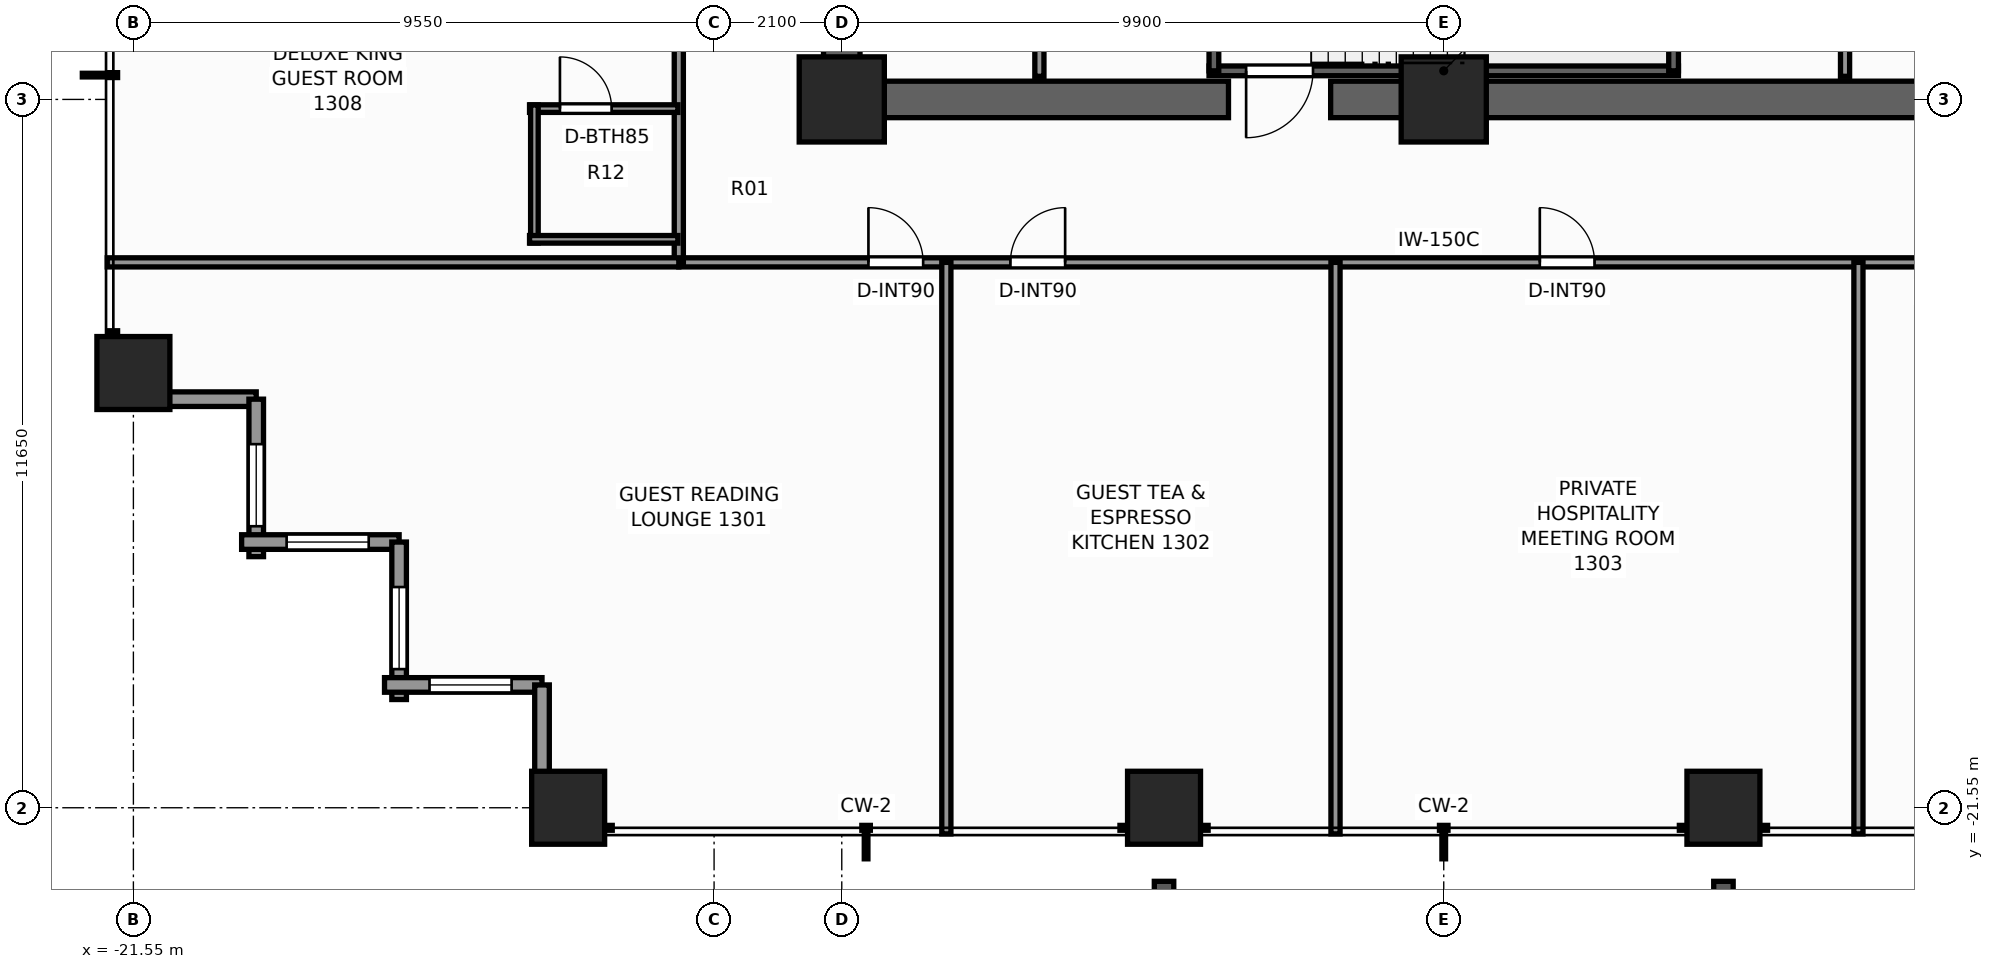
"""IFC4 building model, lengths in metres.
Left out: names, types, materials, properties, quantities, classifications, styles, units other than length and angle.
Written with IfcOpenShell. Run it as: python <this file> out.ifc"""

import sys

from ifc_helpers import new_model, si_unit, direction, frame, frame_2d, origin, origin_2d, place, context, subcontext, project, spatial, rectangle, extrude, element, fill, save


model = new_model("IFC4")
c1 = context("Model", 3, precision=1e-05, world=origin(), true_north=direction((0.0, 1.0)))
c2 = subcontext(c1, "Body", "Model", "MODEL_VIEW")
j1 = project(units=[si_unit("LENGTHUNIT", "METRE"), si_unit("PLANEANGLEUNIT", "RADIAN")], contexts=[c1])
p1 = place(None, origin())
s1 = spatial("IfcSite", under=j1, at=p1, CompositionType="ELEMENT")
p2 = place(p1, origin())
s2 = spatial("IfcBuilding", under=s1, at=p2, CompositionType="ELEMENT")
p3 = place(p2, frame((0.0, 0.0, 46.9)))
s3 = spatial("IfcBuildingStorey", under=s2, at=p3, CompositionType="ELEMENT", Elevation=46.9)
p4 = place(p3, frame((10.2, -9.9, 0.0), z_axis=(0.0, 0.0, 1.0), x_axis=(-1.0, 0.0, 0.0)))
e1 = element("IfcWall", 1, at=p4, inside=s3, PredefinedType="SHEAR", context=c2, shape_type="SweptSolid", body=[
    extrude(rectangle(XDim=12.06, YDim=0.6, at=frame_2d((6.03, 0.0))), origin(), (0.0, 0.0, 1.0), 3.3),
])
p5 = place(p3, frame((-3.54, -9.9, 0.0), z_axis=(0.0, 0.0, 1.0), x_axis=(-1.0, 0.0, 0.0)))
e2 = element("IfcWall", 2, at=p5, inside=s3, PredefinedType="SHEAR", context=c2, shape_type="SweptSolid", body=[
    extrude(rectangle(XDim=6.66, YDim=0.6, at=frame_2d((3.33, 0.0))), origin(), (0.0, 0.0, 1.0), 3.3),
])
p6 = place(p3, frame((-9.9, -9.6, 0.0), z_axis=(0.0, 0.0, 1.0), x_axis=(0.0, 1.0, 0.0)))
e3 = element("IfcWall", 3, at=p6, inside=s3, PredefinedType="SHEAR", context=c2, shape_type="SweptSolid", body=[
    extrude(rectangle(XDim=4.05, YDim=0.6, at=frame_2d((2.025, 0.0))), origin(), (0.0, 0.0, 1.0), 3.3),
])
for number, where, z_axis, x_axis in (
    (4, (-9.9, -9.9, 0.0), (0.0, 0.0, 1.0), (1.0, 0.0, 0.0)),
    (5, (0.0, -9.9, 0.0), (0.0, 0.0, 1.0), (1.0, 0.0, 0.0)),
):
    element("IfcColumn", number, at=place(p3, frame(where, z_axis=z_axis, x_axis=x_axis)), inside=s3, PredefinedType="COLUMN", context=c2, shape_type="SweptSolid", body=[
        extrude(rectangle(XDim=1.4, YDim=1.4, at=origin_2d()), origin(), (0.0, 0.0, 1.0), 3.3),
    ])
for number, where, z_axis, x_axis in (
    (6, (-14.4, -21.55, 0.0), (0.0, 0.0, 1.0), (1.0, 0.0, 0.0)),
    (7, (-4.6, -21.55, 0.0), (0.0, 0.0, 1.0), (1.0, 0.0, 0.0)),
    (8, (4.6, -21.55, 0.0), (0.0, 0.0, 1.0), (1.0, 0.0, 0.0)),
    (9, (-21.55, -14.4, 0.0), (0.0, 0.0, 1.0), (1.0, 0.0, 0.0)),
):
    element("IfcColumn", number, at=place(p3, frame(where, z_axis=z_axis, x_axis=x_axis)), inside=s3, PredefinedType="COLUMN", context=c2, shape_type="SweptSolid", body=[
        extrude(rectangle(XDim=1.2, YDim=1.2, at=origin_2d()), origin(), (0.0, 0.0, 1.0), 3.3),
    ])
p7 = place(p3, frame((-19.53, -14.83, 0.0), z_axis=(0.0, 0.0, 1.0), x_axis=(-1.0, 0.0, 0.0)))
e10 = element("IfcWall", 10, at=p7, inside=s3, PredefinedType="STANDARD", context=c2, shape_type="SweptSolid", body=[
    extrude(rectangle(XDim=2.59, YDim=0.24, at=frame_2d((1.295, 0.0))), origin(), (0.0, 0.0, 1.0), 2.439),
])
p8 = place(p3, frame((-19.53, -17.42, 0.0), z_axis=(0.0, 0.0, 1.0), x_axis=(0.0, 1.0, 0.0)))
e11 = element("IfcWall", 11, at=p8, inside=s3, PredefinedType="STANDARD", context=c2, shape_type="SweptSolid", body=[
    extrude(rectangle(XDim=2.59, YDim=0.24, at=frame_2d((1.295, 0.0))), origin(), (0.0, 0.0, 1.0), 2.439),
])
p9 = place(p8, frame((0.5, 0.0, 0.65)))
e12 = element("IfcOpeningElement", 12, at=p9, cuts=e11, PredefinedType="OPENING", context=c2, shape_type="SweptSolid", body=[
    extrude(rectangle(XDim=1.35, YDim=1.55, at=frame_2d((0.675, 0.775))), frame((0.0, 0.13, 0.0), z_axis=(0.0, -1.0, 0.0), x_axis=(1.0, 0.0, 0.0)), (0.0, 0.0, 1.0), 0.26),
])
p10 = place(p3, frame((-17.18, -17.18, 0.0), z_axis=(0.0, 0.0, 1.0), x_axis=(-1.0, 0.0, 0.0)))
e13 = element("IfcWall", 13, at=p10, inside=s3, PredefinedType="STANDARD", context=c2, shape_type="SweptSolid", body=[
    extrude(rectangle(XDim=2.59, YDim=0.24, at=frame_2d((1.295, 0.0))), origin(), (0.0, 0.0, 1.0), 2.439),
])
p11 = place(p10, frame((0.5, 0.0, 0.65)))
e14 = element("IfcOpeningElement", 14, at=p11, cuts=e13, PredefinedType="OPENING", context=c2, shape_type="SweptSolid", body=[
    extrude(rectangle(XDim=1.35, YDim=1.55, at=frame_2d((0.675, 0.775))), frame((0.0, 0.13, 0.0), z_axis=(0.0, -1.0, 0.0), x_axis=(1.0, 0.0, 0.0)), (0.0, 0.0, 1.0), 0.26),
])
p12 = place(p3, frame((-17.18, -19.77, 0.0), z_axis=(0.0, 0.0, 1.0), x_axis=(0.0, 1.0, 0.0)))
e15 = element("IfcWall", 15, at=p12, inside=s3, PredefinedType="STANDARD", context=c2, shape_type="SweptSolid", body=[
    extrude(rectangle(XDim=2.59, YDim=0.24, at=frame_2d((1.295, 0.0))), origin(), (0.0, 0.0, 1.0), 2.439),
])
p13 = place(p12, frame((0.5, 0.0, 0.65)))
e16 = element("IfcOpeningElement", 16, at=p13, cuts=e15, PredefinedType="OPENING", context=c2, shape_type="SweptSolid", body=[
    extrude(rectangle(XDim=1.35, YDim=1.55, at=frame_2d((0.675, 0.775))), frame((0.0, 0.13, 0.0), z_axis=(0.0, -1.0, 0.0), x_axis=(1.0, 0.0, 0.0)), (0.0, 0.0, 1.0), 0.26),
])
p14 = place(p3, frame((-14.83, -19.53, 0.0), z_axis=(0.0, 0.0, 1.0), x_axis=(-1.0, 0.0, 0.0)))
e17 = element("IfcWall", 17, at=p14, inside=s3, PredefinedType="STANDARD", context=c2, shape_type="SweptSolid", body=[
    extrude(rectangle(XDim=2.59, YDim=0.24, at=frame_2d((1.295, 0.0))), origin(), (0.0, 0.0, 1.0), 2.439),
])
p15 = place(p14, frame((0.5, 0.0, 0.65)))
e18 = element("IfcOpeningElement", 18, at=p15, cuts=e17, PredefinedType="OPENING", context=c2, shape_type="SweptSolid", body=[
    extrude(rectangle(XDim=1.35, YDim=1.55, at=frame_2d((0.675, 0.775))), frame((0.0, 0.13, 0.0), z_axis=(0.0, -1.0, 0.0), x_axis=(1.0, 0.0, 0.0)), (0.0, 0.0, 1.0), 0.26),
])
p16 = place(p3, frame((-14.83, -22.12, 0.0), z_axis=(0.0, 0.0, 1.0), x_axis=(0.0, 1.0, 0.0)))
e19 = element("IfcWall", 19, at=p16, inside=s3, PredefinedType="STANDARD", context=c2, shape_type="SweptSolid", body=[
    extrude(rectangle(XDim=2.59, YDim=0.24, at=frame_2d((1.295, 0.0))), origin(), (0.0, 0.0, 1.0), 2.439),
])
p17 = place(p3, frame((3.86, -9.43, 0.0), z_axis=(0.0, 0.0, 1.0), x_axis=(-1.0, 0.0, 0.0)))
e20 = element("IfcWall", 20, at=p17, inside=s3, PredefinedType="SHEAR", context=c2, shape_type="SweptSolid", body=[
    extrude(rectangle(XDim=7.72, YDim=0.16, at=frame_2d((3.86, 0.0))), origin(), (0.0, 0.0, 1.0), 3.3),
])
p18 = place(p17, frame((6.01, 0.0, 0.0)))
e21 = element("IfcOpeningElement", 21, at=p18, cuts=e20, PredefinedType="OPENING", context=c2, shape_type="SweptSolid", body=[
    extrude(rectangle(XDim=1.1, YDim=2.2, at=frame_2d((0.55, 1.1))), frame((0.0, 0.09, 0.0), z_axis=(0.0, -1.0, 0.0), x_axis=(1.0, 0.0, 0.0)), (0.0, 0.0, 1.0), 0.18),
])
for number, where, z_axis, x_axis in (
    (22, (-3.78, -9.43, 0.0), (0.0, 0.0, 1.0), (0.0, 1.0, 0.0)),
    (23, (3.78, -9.43, 0.0), (0.0, 0.0, 1.0), (0.0, 1.0, 0.0)),
):
    element("IfcWall", number, at=place(p3, frame(where, z_axis=z_axis, x_axis=x_axis)), inside=s3, PredefinedType="SHEAR", context=c2, shape_type="SweptSolid", body=[
        extrude(rectangle(XDim=3.35, YDim=0.16, at=frame_2d((1.675, 0.0))), origin(), (0.0, 0.0, 1.0), 3.3),
    ])
p19 = place(p3, frame((-6.65, -9.52, 0.0), z_axis=(0.0, 0.0, 1.0), x_axis=(0.0, 1.0, 0.0)))
e24 = element("IfcWall", 24, at=p19, inside=s3, PredefinedType="PARTITIONING", context=c2, shape_type="SweptSolid", body=[
    extrude(rectangle(XDim=3.8, YDim=0.15, at=frame_2d((1.9, 0.0))), origin(), (0.0, 0.0, 1.0), 3.06),
])
p20 = place(p19, frame((0.9, 0.0, 0.0)))
e25 = element("IfcOpeningElement", 25, at=p20, cuts=e24, PredefinedType="OPENING", context=c2, shape_type="SweptSolid", body=[
    extrude(rectangle(XDim=0.85, YDim=2.03, at=frame_2d((0.425, 1.015))), frame((0.0, 0.085, 0.0), z_axis=(0.0, -1.0, 0.0), x_axis=(1.0, 0.0, 0.0)), (0.0, 0.0, 1.0), 0.17),
])
p21 = place(p3, frame((6.6, -9.52, 0.0), z_axis=(0.0, 0.0, 1.0), x_axis=(0.0, 1.0, 0.0)))
e26 = element("IfcWall", 26, at=p21, inside=s3, PredefinedType="PARTITIONING", context=c2, shape_type="SweptSolid", body=[
    extrude(rectangle(XDim=3.8, YDim=0.15, at=frame_2d((1.9, 0.0))), origin(), (0.0, 0.0, 1.0), 3.06),
])
p22 = place(p21, frame((0.9, 0.0, 0.0)))
e27 = element("IfcOpeningElement", 27, at=p22, cuts=e26, PredefinedType="OPENING", context=c2, shape_type="SweptSolid", body=[
    extrude(rectangle(XDim=0.85, YDim=2.03, at=frame_2d((0.425, 1.015))), frame((0.0, 0.085, 0.0), z_axis=(0.0, -1.0, 0.0), x_axis=(1.0, 0.0, 0.0)), (0.0, 0.0, 1.0), 0.17),
])
p23 = place(p3, frame((-12.58, -12.58, 0.0), z_axis=(0.0, 0.0, 1.0), x_axis=(1.0, 0.0, 0.0)))
e28 = element("IfcWall", 28, at=p23, inside=s3, PredefinedType="PARTITIONING", context=c2, shape_type="SweptSolid", body=[
    extrude(rectangle(XDim=25.0, YDim=0.15, at=frame_2d((12.5, 0.0))), origin(), (0.0, 0.0, 1.0), 2.272),
])
p24 = place(p23, frame((3.118, 0.0, 0.0)))
e29 = element("IfcOpeningElement", 29, at=p24, cuts=e28, PredefinedType="OPENING", context=c2, shape_type="SweptSolid", body=[
    extrude(rectangle(XDim=0.9, YDim=2.06, at=frame_2d((0.45, 1.03))), frame((0.0, 0.085, 0.0), z_axis=(0.0, -1.0, 0.0), x_axis=(1.0, 0.0, 0.0)), (0.0, 0.0, 1.0), 0.17),
])
p25 = place(p23, frame((5.454, 0.0, 0.0)))
e30 = element("IfcOpeningElement", 30, at=p25, cuts=e28, PredefinedType="OPENING", context=c2, shape_type="SweptSolid", body=[
    extrude(rectangle(XDim=0.9, YDim=2.06, at=frame_2d((0.45, 1.03))), frame((0.0, 0.085, 0.0), z_axis=(0.0, -1.0, 0.0), x_axis=(1.0, 0.0, 0.0)), (0.0, 0.0, 1.0), 0.17),
])
p26 = place(p23, frame((14.16, 0.0, 0.0)))
e31 = element("IfcOpeningElement", 31, at=p26, cuts=e28, PredefinedType="OPENING", context=c2, shape_type="SweptSolid", body=[
    extrude(rectangle(XDim=0.9, YDim=2.06, at=frame_2d((0.45, 1.03))), frame((0.0, 0.085, 0.0), z_axis=(0.0, -1.0, 0.0), x_axis=(1.0, 0.0, 0.0)), (0.0, 0.0, 1.0), 0.17),
])
p27 = place(p23, frame((20.541, 0.0, 0.0)))
e32 = element("IfcOpeningElement", 32, at=p27, cuts=e28, PredefinedType="OPENING", context=c2, shape_type="SweptSolid", body=[
    extrude(rectangle(XDim=0.9, YDim=2.06, at=frame_2d((0.45, 1.03))), frame((0.0, 0.085, 0.0), z_axis=(0.0, -1.0, 0.0), x_axis=(1.0, 0.0, 0.0)), (0.0, 0.0, 1.0), 0.17),
])
p28 = place(p3, frame((-12.58, -12.58, 0.0), z_axis=(0.0, 0.0, 1.0), x_axis=(0.0, 1.0, 0.0)))
e33 = element("IfcWall", 33, at=p28, inside=s3, PredefinedType="PARTITIONING", context=c2, shape_type="SweptSolid", body=[
    extrude(rectangle(XDim=24.84, YDim=0.15, at=frame_2d((12.42, 0.0))), origin(), (0.0, 0.0, 1.0), 2.272),
])
p29 = place(p28, frame((3.856, 0.0, 0.0)))
e34 = element("IfcOpeningElement", 34, at=p29, cuts=e33, PredefinedType="OPENING", context=c2, shape_type="SweptSolid", body=[
    extrude(rectangle(XDim=0.95, YDim=2.06, at=frame_2d((0.475, 1.03))), frame((0.0, 0.085, 0.0), z_axis=(0.0, -1.0, 0.0), x_axis=(1.0, 0.0, 0.0)), (0.0, 0.0, 1.0), 0.17),
])
p30 = place(p28, frame((9.119, 0.0, 0.0)))
e35 = element("IfcOpeningElement", 35, at=p30, cuts=e33, PredefinedType="OPENING", context=c2, shape_type="SweptSolid", body=[
    extrude(rectangle(XDim=0.95, YDim=2.06, at=frame_2d((0.475, 1.03))), frame((0.0, 0.085, 0.0), z_axis=(0.0, -1.0, 0.0), x_axis=(1.0, 0.0, 0.0)), (0.0, 0.0, 1.0), 0.17),
])
p31 = place(p28, frame((14.428, 0.0, 0.0)))
e36 = element("IfcOpeningElement", 36, at=p31, cuts=e33, PredefinedType="OPENING", context=c2, shape_type="SweptSolid", body=[
    extrude(rectangle(XDim=0.95, YDim=2.06, at=frame_2d((0.475, 1.03))), frame((0.0, 0.085, 0.0), z_axis=(0.0, -1.0, 0.0), x_axis=(1.0, 0.0, 0.0)), (0.0, 0.0, 1.0), 0.17),
])
p32 = place(p28, frame((20.309, 0.0, 0.0)))
e37 = element("IfcOpeningElement", 37, at=p32, cuts=e33, PredefinedType="OPENING", context=c2, shape_type="SweptSolid", body=[
    extrude(rectangle(XDim=0.95, YDim=2.06, at=frame_2d((0.475, 1.03))), frame((0.0, 0.085, 0.0), z_axis=(0.0, -1.0, 0.0), x_axis=(1.0, 0.0, 0.0)), (0.0, 0.0, 1.0), 0.17),
])
p33 = place(p3, frame((-21.98, -12.58, 0.0), z_axis=(0.0, 0.0, 1.0), x_axis=(1.0, 0.0, 0.0)))
e38 = element("IfcWall", 38, at=p33, inside=s3, PredefinedType="PARTITIONING", context=c2, shape_type="SweptSolid", body=[
    extrude(rectangle(XDim=9.4, YDim=0.15, at=frame_2d((4.7, 0.0))), origin(), (0.0, 0.0, 1.0), 2.272),
])
for number, where, z_axis, x_axis in (
    (39, (-8.18, -21.98, 0.0), (0.0, 0.0, 1.0), (0.0, 1.0, 0.0)),
    (40, (-1.78, -21.98, 0.0), (0.0, 0.0, 1.0), (0.0, 1.0, 0.0)),
    (41, (6.82, -21.98, 0.0), (0.0, 0.0, 1.0), (0.0, 1.0, 0.0)),
):
    element("IfcWall", number, at=place(p3, frame(where, z_axis=z_axis, x_axis=x_axis)), inside=s3, PredefinedType="PARTITIONING", context=c2, shape_type="SweptSolid", body=[
        extrude(rectangle(XDim=9.4, YDim=0.15, at=frame_2d((4.7, 0.0))), origin(), (0.0, 0.0, 1.0), 2.429),
    ])
p34 = place(p3, frame((-15.035, -10.051, 0.0), z_axis=(0.0, 0.0, 1.0), x_axis=(1.0, 0.0, 0.0)))
e42 = element("IfcWall", 42, at=p34, inside=s3, PredefinedType="PARTITIONING", context=c2, shape_type="SweptSolid", body=[
    extrude(rectangle(XDim=2.44, YDim=0.125, at=frame_2d((1.22, 0.0))), origin(), (0.0, 0.0, 1.0), 3.06),
])
p35 = place(p34, frame((0.5, 0.0, 0.0)))
e43 = element("IfcOpeningElement", 43, at=p35, cuts=e42, PredefinedType="OPENING", context=c2, shape_type="SweptSolid", body=[
    extrude(rectangle(XDim=0.85, YDim=2.03, at=frame_2d((0.425, 1.015))), frame((0.0, 0.073, 0.0), z_axis=(0.0, -1.0, 0.0), x_axis=(1.0, 0.0, 0.0)), (0.0, 0.0, 1.0), 0.145),
])
p36 = place(p3, frame((-14.955, -12.261, 0.0), z_axis=(0.0, 0.0, 1.0), x_axis=(0.0, 1.0, 0.0)))
e44 = element("IfcWall", 44, at=p36, inside=s3, PredefinedType="PARTITIONING", context=c2, shape_type="SweptSolid", body=[
    extrude(rectangle(XDim=2.27, YDim=0.125, at=frame_2d((1.135, 0.0))), origin(), (0.0, 0.0, 1.0), 2.272),
])
p37 = place(p3, frame((-15.035, -12.201, 0.0), z_axis=(0.0, 0.0, 1.0), x_axis=(1.0, 0.0, 0.0)))
e45 = element("IfcWall", 45, at=p37, inside=s3, PredefinedType="PARTITIONING", context=c2, shape_type="SweptSolid", body=[
    extrude(rectangle(XDim=2.44, YDim=0.125, at=frame_2d((1.22, 0.0))), origin(), (0.0, 0.0, 1.0), 3.06),
])
p38 = place(p9, origin())
e46 = element("IfcWindow", 46, at=p38, inside=s3, PartitioningType="SINGLE_PANEL", PredefinedType="WINDOW", context=c2, shape_type="SweptSolid", body=[
    extrude(rectangle(XDim=1.35, YDim=1.55, at=frame_2d((0.675, 0.775))), frame((0.0, 0.03, 0.0), z_axis=(0.0, -1.0, 0.0), x_axis=(1.0, 0.0, 0.0)), (0.0, 0.0, 1.0), 0.06),
])
fill(e12, e46)
p39 = place(p11, origin())
e47 = element("IfcWindow", 47, at=p39, inside=s3, PartitioningType="SINGLE_PANEL", PredefinedType="WINDOW", context=c2, shape_type="SweptSolid", body=[
    extrude(rectangle(XDim=1.35, YDim=1.55, at=frame_2d((0.675, 0.775))), frame((0.0, 0.03, 0.0), z_axis=(0.0, -1.0, 0.0), x_axis=(1.0, 0.0, 0.0)), (0.0, 0.0, 1.0), 0.06),
])
fill(e14, e47)
p40 = place(p13, origin())
e48 = element("IfcWindow", 48, at=p40, inside=s3, PartitioningType="SINGLE_PANEL", PredefinedType="WINDOW", context=c2, shape_type="SweptSolid", body=[
    extrude(rectangle(XDim=1.35, YDim=1.55, at=frame_2d((0.675, 0.775))), frame((0.0, 0.03, 0.0), z_axis=(0.0, -1.0, 0.0), x_axis=(1.0, 0.0, 0.0)), (0.0, 0.0, 1.0), 0.06),
])
fill(e16, e48)
p41 = place(p15, origin())
e49 = element("IfcWindow", 49, at=p41, inside=s3, PartitioningType="SINGLE_PANEL", PredefinedType="WINDOW", context=c2, shape_type="SweptSolid", body=[
    extrude(rectangle(XDim=1.35, YDim=1.55, at=frame_2d((0.675, 0.775))), frame((0.0, 0.03, 0.0), z_axis=(0.0, -1.0, 0.0), x_axis=(1.0, 0.0, 0.0)), (0.0, 0.0, 1.0), 0.06),
])
fill(e18, e49)
p42 = place(p18, origin())
e50 = element("IfcDoor", 50, at=p42, inside=s3, OperationType="SINGLE_SWING_RIGHT", PredefinedType="DOOR", context=c2, shape_type="SweptSolid", body=[
    extrude(rectangle(XDim=1.1, YDim=2.2, at=frame_2d((0.55, 1.1))), frame((0.0, 0.025, 0.0), z_axis=(0.0, -1.0, 0.0), x_axis=(1.0, 0.0, 0.0)), (0.0, 0.0, 1.0), 0.05),
])
fill(e21, e50)
p43 = place(p24, origin())
e51 = element("IfcDoor", 51, at=p43, inside=s3, OperationType="SINGLE_SWING_LEFT", PredefinedType="DOOR", context=c2, shape_type="SweptSolid", body=[
    extrude(rectangle(XDim=0.9, YDim=2.06, at=frame_2d((0.45, 1.03))), frame((0.0, 0.025, 0.0), z_axis=(0.0, -1.0, 0.0), x_axis=(1.0, 0.0, 0.0)), (0.0, 0.0, 1.0), 0.05),
])
fill(e29, e51)
p44 = place(p25, origin())
e52 = element("IfcDoor", 52, at=p44, inside=s3, OperationType="SINGLE_SWING_RIGHT", PredefinedType="DOOR", context=c2, shape_type="SweptSolid", body=[
    extrude(rectangle(XDim=0.9, YDim=2.06, at=frame_2d((0.45, 1.03))), frame((0.0, 0.025, 0.0), z_axis=(0.0, -1.0, 0.0), x_axis=(1.0, 0.0, 0.0)), (0.0, 0.0, 1.0), 0.05),
])
fill(e30, e52)
p45 = place(p26, origin())
e53 = element("IfcDoor", 53, at=p45, inside=s3, OperationType="SINGLE_SWING_LEFT", PredefinedType="DOOR", context=c2, shape_type="SweptSolid", body=[
    extrude(rectangle(XDim=0.9, YDim=2.06, at=frame_2d((0.45, 1.03))), frame((0.0, 0.025, 0.0), z_axis=(0.0, -1.0, 0.0), x_axis=(1.0, 0.0, 0.0)), (0.0, 0.0, 1.0), 0.05),
])
fill(e31, e53)
p46 = place(p35, origin())
e54 = element("IfcDoor", 54, at=p46, inside=s3, OperationType="SINGLE_SWING_LEFT", PredefinedType="DOOR", context=c2, shape_type="SweptSolid", body=[
    extrude(rectangle(XDim=0.85, YDim=2.03, at=frame_2d((0.425, 1.015))), frame((0.0, 0.025, 0.0), z_axis=(0.0, -1.0, 0.0), x_axis=(1.0, 0.0, 0.0)), (0.0, 0.0, 1.0), 0.05),
])
fill(e43, e54)
save(model, sys.argv[1])
